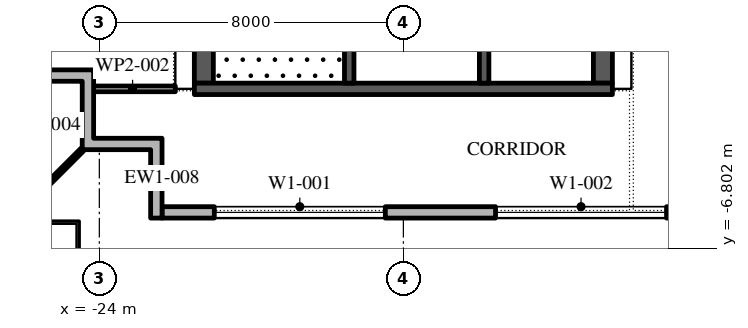
"""IFC4 building model, lengths in metres.
Left out: names, types, materials, properties, quantities, classifications, styles, units other than length and angle.
Written with IfcOpenShell. Run it as: python <this file> out.ifc"""

import sys

from ifc_helpers import new_model, si_unit, direction, frame, frame_2d, origin, place, context, subcontext, project, spatial, polyline, rectangle, outline, extrude, element, fill, save


model = new_model("IFC4")
c1 = context("Model", 3, precision=1e-05, world=origin(), true_north=direction((0.0, 1.0)))
c2 = subcontext(c1, "Body", "Model", "MODEL_VIEW")
j1 = project(units=[si_unit("LENGTHUNIT", "METRE"), si_unit("PLANEANGLEUNIT", "RADIAN")], contexts=[c1])
p1 = place(None, origin())
s1 = spatial("IfcSite", under=j1, at=p1, CompositionType="ELEMENT")
p2 = place(p1, origin())
s2 = spatial("IfcBuilding", under=s1, at=p2, CompositionType="ELEMENT")
p3 = place(p2, frame((0.0, 0.0, 346.8)))
s3 = spatial("IfcBuildingStorey", under=s2, at=p3, CompositionType="ELEMENT", Elevation=346.8)
p4 = place(p3, frame((-22.35, -5.85, 0.0), z_axis=(0.0, 0.0, 1.0), x_axis=(1.0, 0.0, 0.0)))
e1 = element("IfcWall", 1, at=p4, inside=s3, PredefinedType="STANDARD", context=c2, shape_type="SweptSolid", body=[
    extrude(rectangle(XDim=45.0, YDim=0.3, at=frame_2d((22.5, 0.0))), origin(), (0.0, 0.0, 1.0), 4.0),
])
p5 = place(p4, frame((1.375, 0.0, 0.45)))
e2 = element("IfcOpeningElement", 2, at=p5, cuts=e1, PredefinedType="OPENING", context=c2, shape_type="SweptSolid", body=[
    extrude(rectangle(XDim=4.5, YDim=3.05, at=frame_2d((2.25, 1.525))), frame((0.0, 0.16, 0.0), z_axis=(0.0, -1.0, 0.0), x_axis=(1.0, 0.0, 0.0)), (0.0, 0.0, 1.0), 0.32),
])
p6 = place(p4, frame((8.775, 0.0, 0.45)))
e3 = element("IfcOpeningElement", 3, at=p6, cuts=e1, PredefinedType="OPENING", context=c2, shape_type="SweptSolid", body=[
    extrude(rectangle(XDim=4.5, YDim=3.05, at=frame_2d((2.25, 1.525))), frame((0.0, 0.16, 0.0), z_axis=(0.0, -1.0, 0.0), x_axis=(1.0, 0.0, 0.0)), (0.0, 0.0, 1.0), 0.32),
])
p7 = place(p4, frame((17.375, 0.0, 0.0)))
e4 = element("IfcOpeningElement", 4, at=p7, cuts=e1, PredefinedType="OPENING", context=c2, shape_type="SweptSolid", body=[
    extrude(rectangle(XDim=2.4, YDim=3.5, at=frame_2d((1.2, 1.75))), frame((0.0, 0.16, 0.0), z_axis=(0.0, -1.0, 0.0), x_axis=(1.0, 0.0, 0.0)), (0.0, 0.0, 1.0), 0.32),
])
p8 = place(p4, frame((23.875, 0.0, 0.45)))
e5 = element("IfcOpeningElement", 5, at=p8, cuts=e1, PredefinedType="OPENING", context=c2, shape_type="SweptSolid", body=[
    extrude(rectangle(XDim=4.5, YDim=3.05, at=frame_2d((2.25, 1.525))), frame((0.0, 0.16, 0.0), z_axis=(0.0, -1.0, 0.0), x_axis=(1.0, 0.0, 0.0)), (0.0, 0.0, 1.0), 0.32),
])
p9 = place(p4, frame((31.425, 0.0, 0.45)))
e6 = element("IfcOpeningElement", 6, at=p9, cuts=e1, PredefinedType="OPENING", context=c2, shape_type="SweptSolid", body=[
    extrude(rectangle(XDim=4.5, YDim=3.05, at=frame_2d((2.25, 1.525))), frame((0.0, 0.16, 0.0), z_axis=(0.0, -1.0, 0.0), x_axis=(1.0, 0.0, 0.0)), (0.0, 0.0, 1.0), 0.32),
])
p10 = place(p4, frame((38.975, 0.0, 0.45)))
e7 = element("IfcOpeningElement", 7, at=p10, cuts=e1, PredefinedType="OPENING", context=c2, shape_type="SweptSolid", body=[
    extrude(rectangle(XDim=4.5, YDim=3.05, at=frame_2d((2.25, 1.525))), frame((0.0, 0.16, 0.0), z_axis=(0.0, -1.0, 0.0), x_axis=(1.0, 0.0, 0.0)), (0.0, 0.0, 1.0), 0.32),
])
p11 = place(p3, origin())
e8 = element("IfcWall", 8, at=p11, inside=s3, PredefinedType="STANDARD", context=c2, shape_type="SweptSolid", body=[
    extrude(outline(polyline([(-22.65, -4.2), (-24.45, -4.2), (-24.45, -2.4), (-25.95, -2.4), (-25.95, -2.1), (-24.15, -2.1), (-24.15, -3.9), (-22.35, -3.9), (-22.35, -6.0), (-22.65, -6.0), (-22.65, -4.2)])), origin(), (0.0, 0.0, 1.0), 4.0),
])
p12 = place(p3, frame((-24.45, -4.2, -0.05), z_axis=(0.0, 0.0, 1.0), x_axis=(-0.707106781187, -0.707106781187, 0.0)))
e9 = element("IfcWall", 9, at=p12, inside=s3, PredefinedType="STANDARD", context=c2, shape_type="SweptSolid", body=[
    extrude(rectangle(XDim=2.667, YDim=0.1, at=frame_2d((1.333, 0.0))), origin(), (0.0, 0.0, 1.0), 4.05),
])
p13 = place(p3, frame((-21.25, -2.45, 0.0), z_axis=(0.0, 0.0, 1.0), x_axis=(0.0, 1.0, 0.0)))
e10 = element("IfcWall", 10, at=p13, inside=s3, PredefinedType="SHEAR", context=c2, shape_type="SweptSolid", body=[
    extrude(rectangle(XDim=27.9, YDim=0.5, at=frame_2d((13.95, 0.0))), origin(), (0.0, 0.0, 1.0), 4.0),
])
p14 = place(p13, frame((5.05, 0.0, 0.0)))
e11 = element("IfcOpeningElement", 11, at=p14, cuts=e10, PredefinedType="OPENING", context=c2, shape_type="SweptSolid", body=[
    extrude(rectangle(XDim=1.2, YDim=2.1, at=frame_2d((0.6, 1.05))), frame((0.0, 0.26, 0.0), z_axis=(0.0, -1.0, 0.0), x_axis=(1.0, 0.0, 0.0)), (0.0, 0.0, 1.0), 0.52),
])
p15 = place(p13, frame((21.65, 0.0, 0.0)))
e12 = element("IfcOpeningElement", 12, at=p15, cuts=e10, PredefinedType="OPENING", context=c2, shape_type="SweptSolid", body=[
    extrude(rectangle(XDim=1.2, YDim=2.1, at=frame_2d((0.6, 1.05))), frame((0.0, 0.26, 0.0), z_axis=(0.0, -1.0, 0.0), x_axis=(1.0, 0.0, 0.0)), (0.0, 0.0, 1.0), 0.52),
])
p16 = place(p3, frame((-10.75, -2.45, 0.0), z_axis=(0.0, 0.0, 1.0), x_axis=(0.0, 1.0, 0.0)))
e13 = element("IfcWall", 13, at=p16, inside=s3, PredefinedType="SHEAR", context=c2, shape_type="SweptSolid", body=[
    extrude(rectangle(XDim=27.9, YDim=0.5, at=frame_2d((13.95, 0.0))), origin(), (0.0, 0.0, 1.0), 4.0),
])
p17 = place(p16, frame((23.65, 0.0, 0.0)))
e14 = element("IfcOpeningElement", 14, at=p17, cuts=e13, PredefinedType="OPENING", context=c2, shape_type="SweptSolid", body=[
    extrude(rectangle(XDim=2.4, YDim=2.1, at=frame_2d((1.2, 1.05))), frame((0.0, 0.26, 0.0), z_axis=(0.0, -1.0, 0.0), x_axis=(1.0, 0.0, 0.0)), (0.0, 0.0, 1.0), 0.52),
])
p18 = place(p16, frame((1.387, 0.0, 0.0)))
e15 = element("IfcOpeningElement", 15, at=p18, cuts=e13, PredefinedType="OPENING", context=c2, shape_type="SweptSolid", body=[
    extrude(rectangle(XDim=0.9, YDim=2.1, at=frame_2d((0.45, 1.05))), frame((0.0, 0.26, 0.0), z_axis=(0.0, -1.0, 0.0), x_axis=(1.0, 0.0, 0.0)), (0.0, 0.0, 1.0), 0.52),
])
p19 = place(p16, frame((4.562, 0.0, 0.0)))
e16 = element("IfcOpeningElement", 16, at=p19, cuts=e13, PredefinedType="OPENING", context=c2, shape_type="SweptSolid", body=[
    extrude(rectangle(XDim=1.0, YDim=2.1, at=frame_2d((0.5, 1.05))), frame((0.0, 0.26, 0.0), z_axis=(0.0, -1.0, 0.0), x_axis=(1.0, 0.0, 0.0)), (0.0, 0.0, 1.0), 0.52),
])
p20 = place(p3, frame((-21.5, -2.6, 0.0), z_axis=(0.0, 0.0, 1.0), x_axis=(1.0, 0.0, 0.0)))
e17 = element("IfcWall", 17, at=p20, inside=s3, PredefinedType="SHEAR", context=c2, shape_type="SweptSolid", body=[
    extrude(rectangle(XDim=11.0, YDim=0.3, at=frame_2d((5.5, 0.0))), origin(), (0.0, 0.0, 1.0), 4.0),
])
p21 = place(p3, frame((-17.425, -2.45, 0.0), z_axis=(0.0, 0.0, 1.0), x_axis=(0.0, 1.0, 0.0)))
e18 = element("IfcWall", 18, at=p21, inside=s3, PredefinedType="SHEAR", context=c2, shape_type="SweptSolid", body=[
    extrude(rectangle(XDim=6.3, YDim=0.25, at=frame_2d((3.15, 0.0))), origin(), (0.0, 0.0, 1.0), 4.0),
])
p22 = place(p21, frame((5.05, 0.0, 0.0)))
e19 = element("IfcOpeningElement", 19, at=p22, cuts=e18, PredefinedType="OPENING", context=c2, shape_type="SweptSolid", body=[
    extrude(rectangle(XDim=1.2, YDim=2.1, at=frame_2d((0.6, 1.05))), frame((0.0, 0.135, 0.0), z_axis=(0.0, -1.0, 0.0), x_axis=(1.0, 0.0, 0.0)), (0.0, 0.0, 1.0), 0.27),
])
p23 = place(p3, frame((-13.875, -2.45, 0.0), z_axis=(0.0, 0.0, 1.0), x_axis=(0.0, 1.0, 0.0)))
e20 = element("IfcWall", 20, at=p23, inside=s3, PredefinedType="SHEAR", context=c2, shape_type="SweptSolid", body=[
    extrude(rectangle(XDim=21.3, YDim=0.25, at=frame_2d((10.65, 0.0))), origin(), (0.0, 0.0, 1.0), 4.0),
])
p24 = place(p23, frame((9.846, 0.0, 0.0)))
e21 = element("IfcOpeningElement", 21, at=p24, cuts=e20, PredefinedType="OPENING", context=c2, shape_type="SweptSolid", body=[
    extrude(rectangle(XDim=0.9, YDim=2.1, at=frame_2d((0.45, 1.05))), frame((0.0, 0.135, 0.0), z_axis=(0.0, -1.0, 0.0), x_axis=(1.0, 0.0, 0.0)), (0.0, 0.0, 1.0), 0.27),
])
p25 = place(p23, frame((12.911, 0.0, 0.0)))
e22 = element("IfcOpeningElement", 22, at=p25, cuts=e20, PredefinedType="OPENING", context=c2, shape_type="SweptSolid", body=[
    extrude(rectangle(XDim=0.9, YDim=2.1, at=frame_2d((0.45, 1.05))), frame((0.0, 0.135, 0.0), z_axis=(0.0, -1.0, 0.0), x_axis=(1.0, 0.0, 0.0)), (0.0, 0.0, 1.0), 0.27),
])
p26 = place(p23, frame((6.971, 0.0, 0.0)))
e23 = element("IfcOpeningElement", 23, at=p26, cuts=e20, PredefinedType="OPENING", context=c2, shape_type="SweptSolid", body=[
    extrude(rectangle(XDim=1.1, YDim=2.1, at=frame_2d((0.55, 1.05))), frame((0.0, 0.135, 0.0), z_axis=(0.0, -1.0, 0.0), x_axis=(1.0, 0.0, 0.0)), (0.0, 0.0, 1.0), 0.27),
])
p27 = place(p23, frame((15.543, 0.0, 0.0)))
e24 = element("IfcOpeningElement", 24, at=p27, cuts=e20, PredefinedType="OPENING", context=c2, shape_type="SweptSolid", body=[
    extrude(rectangle(XDim=1.1, YDim=2.1, at=frame_2d((0.55, 1.05))), frame((0.0, 0.135, 0.0), z_axis=(0.0, -1.0, 0.0), x_axis=(1.0, 0.0, 0.0)), (0.0, 0.0, 1.0), 0.27),
])
p28 = place(p23, frame((17.686, 0.0, 0.0)))
e25 = element("IfcOpeningElement", 25, at=p28, cuts=e20, PredefinedType="OPENING", context=c2, shape_type="SweptSolid", body=[
    extrude(rectangle(XDim=1.1, YDim=2.1, at=frame_2d((0.55, 1.05))), frame((0.0, 0.135, 0.0), z_axis=(0.0, -1.0, 0.0), x_axis=(1.0, 0.0, 0.0)), (0.0, 0.0, 1.0), 0.27),
])
p29 = place(p23, frame((19.829, 0.0, 0.0)))
e26 = element("IfcOpeningElement", 26, at=p29, cuts=e20, PredefinedType="OPENING", context=c2, shape_type="SweptSolid", body=[
    extrude(rectangle(XDim=1.1, YDim=2.1, at=frame_2d((0.55, 1.05))), frame((0.0, 0.135, 0.0), z_axis=(0.0, -1.0, 0.0), x_axis=(1.0, 0.0, 0.0)), (0.0, 0.0, 1.0), 0.27),
])
p30 = place(p3, frame((-24.25, -2.6, 0.0), z_axis=(0.0, 0.0, 1.0), x_axis=(1.0, 0.0, 0.0)))
e27 = element("IfcWall", 27, at=p30, inside=s3, PredefinedType="PARTITIONING", context=c2, shape_type="SweptSolid", body=[
    extrude(rectangle(XDim=2.25, YDim=0.15, at=frame_2d((1.125, 0.0))), origin(), (0.0, 0.0, 1.0), 4.0),
])
p31 = place(p5, origin())
e28 = element("IfcWindow", 28, at=p31, inside=s3, PartitioningType="DOUBLE_PANEL_VERTICAL", PredefinedType="WINDOW", context=c2, shape_type="SweptSolid", body=[
    extrude(rectangle(XDim=4.5, YDim=3.05, at=frame_2d((2.25, 1.525))), frame((0.0, 0.03, 0.0), z_axis=(0.0, -1.0, 0.0), x_axis=(1.0, 0.0, 0.0)), (0.0, 0.0, 1.0), 0.06),
])
fill(e2, e28)
p32 = place(p6, origin())
e29 = element("IfcWindow", 29, at=p32, inside=s3, PartitioningType="DOUBLE_PANEL_VERTICAL", PredefinedType="WINDOW", context=c2, shape_type="SweptSolid", body=[
    extrude(rectangle(XDim=4.5, YDim=3.05, at=frame_2d((2.25, 1.525))), frame((0.0, 0.03, 0.0), z_axis=(0.0, -1.0, 0.0), x_axis=(1.0, 0.0, 0.0)), (0.0, 0.0, 1.0), 0.06),
])
fill(e3, e29)
save(model, sys.argv[1])
